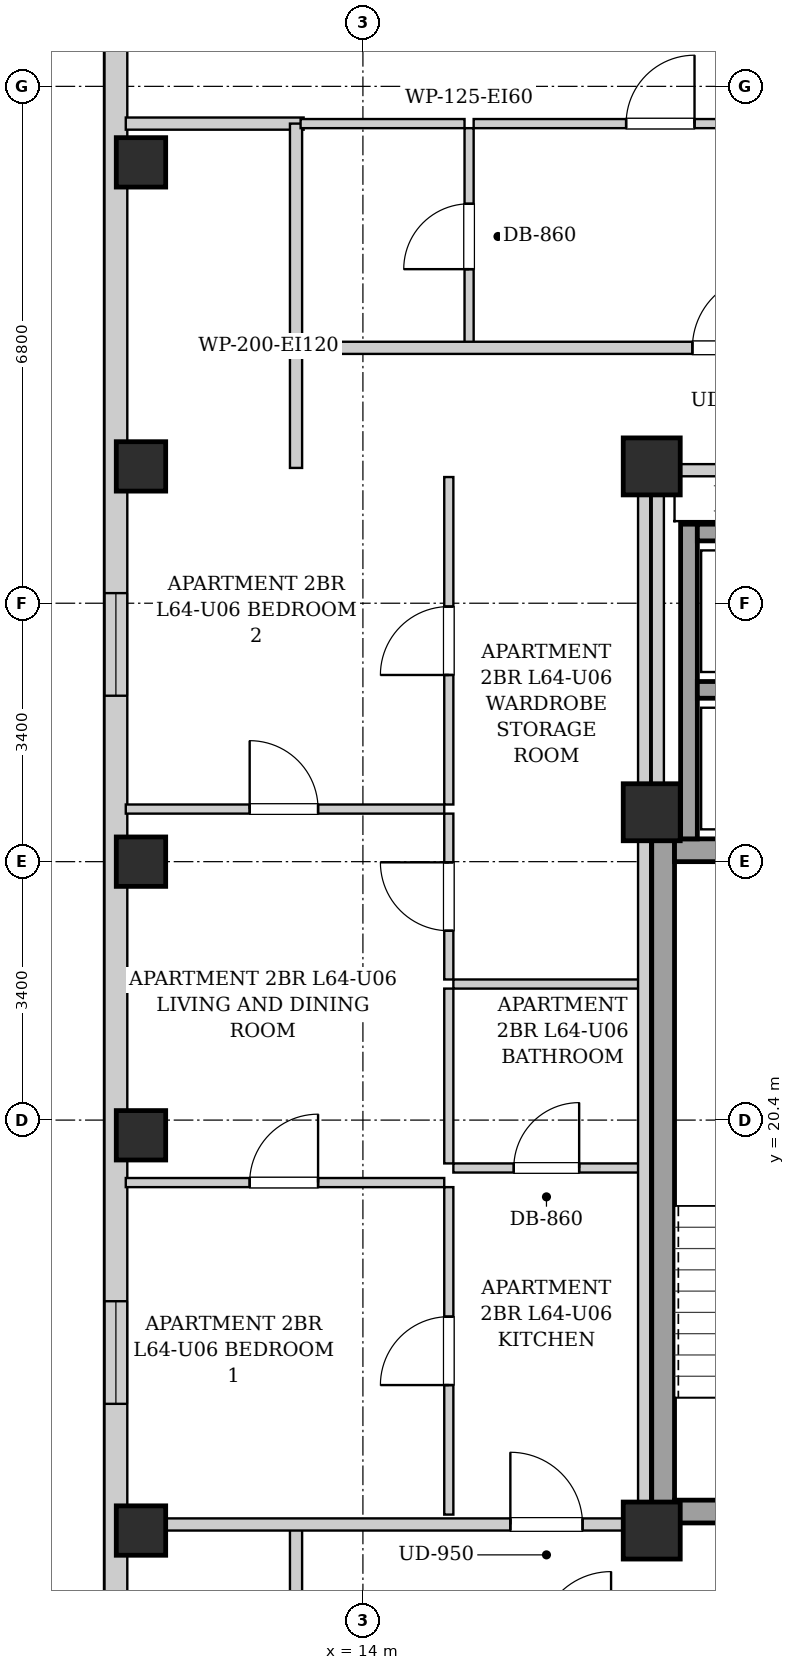
"""IFC4 building model, lengths in metres.
Left out: names, types, materials, properties, quantities, classifications, styles, units other than length and angle.
Written with IfcOpenShell. Run it as: python <this file> out.ifc"""

import sys

from ifc_helpers import new_model, si_unit, direction, frame, frame_2d, origin, origin_2d, place, context, subcontext, project, spatial, rectangle, extrude, element, fill, save


model = new_model("IFC4")
c1 = context("Model", 3, precision=1e-05, world=origin(), true_north=direction((0.0, 1.0)))
c2 = subcontext(c1, "Body", "Model", "MODEL_VIEW")
j1 = project(units=[si_unit("LENGTHUNIT", "METRE"), si_unit("PLANEANGLEUNIT", "RADIAN")], contexts=[c1])
p1 = place(None, origin())
s1 = spatial("IfcSite", under=j1, at=p1, CompositionType="ELEMENT")
p2 = place(p1, origin())
s2 = spatial("IfcBuilding", under=s1, at=p2, CompositionType="ELEMENT")
p3 = place(p2, frame((0.0, 0.0, 220.7)))
s3 = spatial("IfcBuildingStorey", under=s2, at=p3, CompositionType="ELEMENT", Elevation=220.7)
for number, where, z_axis, x_axis in (
    (1, (11.08, 15.0, 0.0), (0.0, 0.0, 1.0), (1.0, 0.0, 0.0)),
    (2, (11.08, 20.2, 0.0), (0.0, 0.0, 1.0), (1.0, 0.0, 0.0)),
    (3, (11.08, 23.8, 0.0), (0.0, 0.0, 1.0), (1.0, 0.0, 0.0)),
    (4, (11.08, 29.0, 0.0), (0.0, 0.0, 1.0), (1.0, 0.0, 0.0)),
    (5, (11.08, 33.0, 0.0), (0.0, 0.0, 1.0), (1.0, 0.0, 0.0)),
):
    element("IfcColumn", number, at=place(p3, frame(where, z_axis=z_axis, x_axis=x_axis)), inside=s3, PredefinedType="COLUMN", context=c2, shape_type="SweptSolid", body=[
        extrude(rectangle(XDim=0.65, YDim=0.65, at=origin_2d()), origin(), (0.0, 0.0, 1.0), 3.4),
    ])
for number, where, z_axis, x_axis in (
    (6, (17.8, 15.0, 0.0), (0.0, 0.0, 1.0), (1.0, 0.0, 0.0)),
    (7, (17.8, 29.0, 0.0), (0.0, 0.0, 1.0), (1.0, 0.0, 0.0)),
    (8, (17.8, 24.45, 0.0), (0.0, 0.0, 1.0), (1.0, 0.0, 0.0)),
):
    element("IfcColumn", number, at=place(p3, frame(where, z_axis=z_axis, x_axis=x_axis)), inside=s3, PredefinedType="COLUMN", context=c2, shape_type="SweptSolid", body=[
        extrude(rectangle(XDim=0.75, YDim=0.75, at=origin_2d()), origin(), (0.0, 0.0, 1.0), 3.4),
    ])
p4 = place(p3, frame((10.75, 6.3, 0.0), z_axis=(0.0, 0.0, 1.0), x_axis=(0.0, 1.0, 0.0)))
e9 = element("IfcWall", 9, at=p4, inside=s3, PredefinedType="SOLIDWALL", context=c2, shape_type="SweptSolid", body=[
    extrude(rectangle(XDim=31.4, YDim=0.3, at=frame_2d((15.7, 0.0))), origin(), (0.0, 0.0, 1.0), 3.14),
])
p5 = place(p4, frame((1.504, 0.0, 0.55)))
e10 = element("IfcOpeningElement", 10, at=p5, cuts=e9, PredefinedType="OPENING", context=c2, shape_type="SweptSolid", body=[
    extrude(rectangle(XDim=1.35, YDim=1.2, at=frame_2d((0.675, 0.6))), frame((0.0, 0.16, 0.0), z_axis=(0.0, -1.0, 0.0), x_axis=(1.0, 0.0, 0.0)), (0.0, 0.0, 1.0), 0.32),
])
p6 = place(p4, frame((28.546, 0.0, 0.55)))
e11 = element("IfcOpeningElement", 11, at=p6, cuts=e9, PredefinedType="OPENING", context=c2, shape_type="SweptSolid", body=[
    extrude(rectangle(XDim=1.35, YDim=1.2, at=frame_2d((0.675, 0.6))), frame((0.0, 0.16, 0.0), z_axis=(0.0, -1.0, 0.0), x_axis=(1.0, 0.0, 0.0)), (0.0, 0.0, 1.0), 0.32),
])
p7 = place(p4, frame((10.367, 0.0, 0.55)))
e12 = element("IfcOpeningElement", 12, at=p7, cuts=e9, PredefinedType="OPENING", context=c2, shape_type="SweptSolid", body=[
    extrude(rectangle(XDim=1.35, YDim=1.2, at=frame_2d((0.675, 0.6))), frame((0.0, 0.16, 0.0), z_axis=(0.0, -1.0, 0.0), x_axis=(1.0, 0.0, 0.0)), (0.0, 0.0, 1.0), 0.32),
])
p8 = place(p4, frame((19.683, 0.0, 0.55)))
e13 = element("IfcOpeningElement", 13, at=p8, cuts=e9, PredefinedType="OPENING", context=c2, shape_type="SweptSolid", body=[
    extrude(rectangle(XDim=1.35, YDim=1.2, at=frame_2d((0.675, 0.6))), frame((0.0, 0.16, 0.0), z_axis=(0.0, -1.0, 0.0), x_axis=(1.0, 0.0, 0.0)), (0.0, 0.0, 1.0), 0.32),
])
p9 = place(p3, frame((17.95, 15.1, 0.0), z_axis=(0.0, 0.0, 1.0), x_axis=(0.0, 1.0, 0.0)))
e14 = element("IfcWall", 14, at=p9, inside=s3, PredefinedType="SHEAR", context=c2, shape_type="SweptSolid", body=[
    extrude(rectangle(XDim=9.0, YDim=0.3, at=frame_2d((4.5, 0.0))), origin(), (0.0, 0.0, 1.0), 3.14),
])
p10 = place(p3, frame((18.1, 23.95, 0.0), z_axis=(0.0, 0.0, 1.0), x_axis=(1.0, 0.0, 0.0)))
e15 = element("IfcWall", 15, at=p10, inside=s3, PredefinedType="SHEAR", context=c2, shape_type="SweptSolid", body=[
    extrude(rectangle(XDim=2.85, YDim=0.3, at=frame_2d((1.425, 0.0))), origin(), (0.0, 0.0, 1.0), 3.14),
])
p11 = place(p3, frame((18.1, 15.25, 0.0), z_axis=(0.0, 0.0, 1.0), x_axis=(1.0, 0.0, 0.0)))
e16 = element("IfcWall", 16, at=p11, inside=s3, PredefinedType="SHEAR", context=c2, shape_type="SweptSolid", body=[
    extrude(rectangle(XDim=2.85, YDim=0.3, at=frame_2d((1.425, 0.0))), origin(), (0.0, 0.0, 1.0), 3.14),
])
p12 = place(p11, frame((0.86, 0.0, 0.0)))
e17 = element("IfcOpeningElement", 17, at=p12, cuts=e16, PredefinedType="OPENING", context=c2, shape_type="SweptSolid", body=[
    extrude(rectangle(XDim=1.1, YDim=2.05, at=frame_2d((0.55, 1.025))), frame((0.0, 0.16, 0.0), z_axis=(0.0, -1.0, 0.0), x_axis=(1.0, 0.0, 0.0)), (0.0, 0.0, 1.0), 0.32),
])
p13 = place(p3, frame((18.29, 24.1, 0.0), z_axis=(0.0, 0.0, 1.0), x_axis=(0.0, 1.0, 0.0)))
e18 = element("IfcWall", 18, at=p13, inside=s3, PredefinedType="SHEAR", context=c2, shape_type="SweptSolid", body=[
    extrude(rectangle(XDim=4.14, YDim=0.22, at=frame_2d((2.07, 0.0))), origin(), (0.0, 0.0, 1.0), 3.14),
])
for number, where, z_axis, x_axis in (
    (19, (18.4, 26.06, 0.0), (0.0, 0.0, 1.0), (1.0, 0.0, 0.0)),
    (20, (18.4, 28.13, 0.0), (0.0, 0.0, 1.0), (1.0, 0.0, 0.0)),
):
    element("IfcWall", number, at=place(p3, frame(where, z_axis=z_axis, x_axis=x_axis)), inside=s3, PredefinedType="SHEAR", context=c2, shape_type="SweptSolid", body=[
        extrude(rectangle(XDim=1.9, YDim=0.22, at=frame_2d((0.95, 0.0))), origin(), (0.0, 0.0, 1.0), 3.14),
    ])
p14 = place(p3, frame((17.88, 24.12, 0.0), z_axis=(0.0, 0.0, 1.0), x_axis=(0.0, 1.0, 0.0)))
e21 = element("IfcWall", 21, at=p14, inside=s3, PredefinedType="PARTITIONING", context=c2, shape_type="SweptSolid", body=[
    extrude(rectangle(XDim=4.76, YDim=0.16, at=frame_2d((2.38, 0.0))), origin(), (0.0, 0.0, 1.0), 3.14),
])
p15 = place(p3, frame((17.96, 28.95, 0.0), z_axis=(0.0, 0.0, 1.0), x_axis=(1.0, 0.0, 0.0)))
e22 = element("IfcWall", 22, at=p15, inside=s3, PredefinedType="PARTITIONING", context=c2, shape_type="SweptSolid", body=[
    extrude(rectangle(XDim=4.29, YDim=0.16, at=frame_2d((2.145, 0.0))), origin(), (0.0, 0.0, 1.0), 2.668),
])
p16 = place(p15, frame((1.715, 0.0, 0.0)))
e23 = element("IfcOpeningElement", 23, at=p16, cuts=e22, PredefinedType="OPENING", context=c2, shape_type="SweptSolid", body=[
    extrude(rectangle(XDim=0.86, YDim=2.05, at=frame_2d((0.43, 1.025))), frame((0.0, 0.09, 0.0), z_axis=(0.0, -1.0, 0.0), x_axis=(1.0, 0.0, 0.0)), (0.0, 0.0, 1.0), 0.18),
])
for number, where, z_axis, x_axis in (
    (24, (13.12, 13.51, 0.0), (0.0, 0.0, 1.0), (0.0, 1.0, 0.0)),
    (25, (13.12, 28.98, 0.0), (0.0, 0.0, 1.0), (0.0, 1.0, 0.0)),
):
    element("IfcWall", number, at=place(p3, frame(where, z_axis=z_axis, x_axis=x_axis)), inside=s3, PredefinedType="PARTITIONING", context=c2, shape_type="SweptSolid", body=[
        extrude(rectangle(XDim=1.58, YDim=0.16, at=frame_2d((0.79, 0.0))), origin(), (0.0, 0.0, 1.0), 3.14),
    ])
p17 = place(p3, frame((10.88, 33.51, 0.0), z_axis=(0.0, 0.0, 1.0), x_axis=(1.0, 0.0, 0.0)))
e26 = element("IfcWall", 26, at=p17, inside=s3, PredefinedType="PARTITIONING", context=c2, shape_type="SweptSolid", body=[
    extrude(rectangle(XDim=2.34, YDim=0.16, at=frame_2d((1.17, 0.0))), origin(), (0.0, 0.0, 1.0), 3.14),
])
p18 = place(p3, frame((13.12, 30.6, 0.0), z_axis=(0.0, 0.0, 1.0), x_axis=(0.0, 1.0, 0.0)))
e27 = element("IfcWall", 27, at=p18, inside=s3, PredefinedType="PARTITIONING", context=c2, shape_type="SweptSolid", body=[
    extrude(rectangle(XDim=2.91, YDim=0.16, at=frame_2d((1.455, 0.0))), origin(), (0.0, 0.0, 1.0), 3.14),
])
p19 = place(p3, frame((15.397, 30.6, 0.0), z_axis=(0.0, 0.0, 1.0), x_axis=(0.0, 1.0, 0.0)))
e28 = element("IfcWall", 28, at=p19, inside=s3, PredefinedType="PARTITIONING", context=c2, shape_type="SweptSolid", body=[
    extrude(rectangle(XDim=2.85, YDim=0.12, at=frame_2d((1.425, 0.0))), origin(), (0.0, 0.0, 1.0), 3.14),
])
p20 = place(p19, frame((0.995, 0.0, 0.0)))
e29 = element("IfcOpeningElement", 29, at=p20, cuts=e28, PredefinedType="OPENING", context=c2, shape_type="SweptSolid", body=[
    extrude(rectangle(XDim=0.86, YDim=2.05, at=frame_2d((0.43, 1.025))), frame((0.0, 0.07, 0.0), z_axis=(0.0, -1.0, 0.0), x_axis=(1.0, 0.0, 0.0)), (0.0, 0.0, 1.0), 0.14),
])
p21 = place(p3, frame((13.18, 33.51, 0.0), z_axis=(0.0, 0.0, 1.0), x_axis=(1.0, 0.0, 0.0)))
e30 = element("IfcWall", 30, at=p21, inside=s3, PredefinedType="PARTITIONING", context=c2, shape_type="SweptSolid", body=[
    extrude(rectangle(XDim=2.157, YDim=0.12, at=frame_2d((1.079, 0.0))), origin(), (0.0, 0.0, 1.0), 3.14),
])
p22 = place(p3, frame((15.457, 33.51, 0.0), z_axis=(0.0, 0.0, 1.0), x_axis=(1.0, 0.0, 0.0)))
e31 = element("IfcWall", 31, at=p22, inside=s3, PredefinedType="PARTITIONING", context=c2, shape_type="SweptSolid", body=[
    extrude(rectangle(XDim=4.913, YDim=0.12, at=frame_2d((2.457, 0.0))), origin(), (0.0, 0.0, 1.0), 3.14),
])
p23 = place(p22, frame((2.006, 0.0, 0.0)))
e32 = element("IfcOpeningElement", 32, at=p23, cuts=e31, PredefinedType="OPENING", context=c2, shape_type="SweptSolid", body=[
    extrude(rectangle(XDim=0.9, YDim=2.05, at=frame_2d((0.45, 1.025))), frame((0.0, 0.07, 0.0), z_axis=(0.0, -1.0, 0.0), x_axis=(1.0, 0.0, 0.0)), (0.0, 0.0, 1.0), 0.14),
])
p24 = place(p3, frame((10.88, 15.08, 0.0), z_axis=(0.0, 0.0, 1.0), x_axis=(1.0, 0.0, 0.0)))
e33 = element("IfcWall", 33, at=p24, inside=s3, PredefinedType="PARTITIONING", context=c2, shape_type="SweptSolid", body=[
    extrude(rectangle(XDim=6.88, YDim=0.16, at=frame_2d((3.44, 0.0))), origin(), (0.0, 0.0, 1.0), 2.668),
])
p25 = place(p24, frame((5.06, 0.0, 0.0)))
e34 = element("IfcOpeningElement", 34, at=p25, cuts=e33, PredefinedType="OPENING", context=c2, shape_type="SweptSolid", body=[
    extrude(rectangle(XDim=0.95, YDim=2.1, at=frame_2d((0.475, 1.05))), frame((0.0, 0.09, 0.0), z_axis=(0.0, -1.0, 0.0), x_axis=(1.0, 0.0, 0.0)), (0.0, 0.0, 1.0), 0.18),
])
p26 = place(p3, frame((15.19, 22.19, 0.0), z_axis=(0.0, 0.0, 1.0), x_axis=(1.0, 0.0, 0.0)))
e35 = element("IfcWall", 35, at=p26, inside=s3, PredefinedType="PARTITIONING", context=c2, shape_type="SweptSolid", body=[
    extrude(rectangle(XDim=2.45, YDim=0.12, at=frame_2d((1.225, 0.0))), origin(), (0.0, 0.0, 1.0), 3.14),
])
p27 = place(p3, frame((15.13, 22.25, 0.0), z_axis=(0.0, 0.0, 1.0), x_axis=(0.0, 1.0, 0.0)))
e36 = element("IfcWall", 36, at=p27, inside=s3, PredefinedType="PARTITIONING", context=c2, shape_type="SweptSolid", body=[
    extrude(rectangle(XDim=2.182, YDim=0.12, at=frame_2d((1.091, 0.0))), origin(), (0.0, 0.0, 1.0), 3.14),
])
p28 = place(p27, frame((0.641, 0.0, 0.0)))
e37 = element("IfcOpeningElement", 37, at=p28, cuts=e36, PredefinedType="OPENING", context=c2, shape_type="SweptSolid", body=[
    extrude(rectangle(XDim=0.9, YDim=2.05, at=frame_2d((0.45, 1.025))), frame((0.0, 0.07, 0.0), z_axis=(0.0, -1.0, 0.0), x_axis=(1.0, 0.0, 0.0)), (0.0, 0.0, 1.0), 0.14),
])
p29 = place(p3, frame((15.13, 24.552, 0.0), z_axis=(0.0, 0.0, 1.0), x_axis=(0.0, 1.0, 0.0)))
e38 = element("IfcWall", 38, at=p29, inside=s3, PredefinedType="PARTITIONING", context=c2, shape_type="SweptSolid", body=[
    extrude(rectangle(XDim=4.308, YDim=0.12, at=frame_2d((2.154, 0.0))), origin(), (0.0, 0.0, 1.0), 3.14),
])
p30 = place(p29, frame((1.704, 0.0, 0.0)))
e39 = element("IfcOpeningElement", 39, at=p30, cuts=e38, PredefinedType="OPENING", context=c2, shape_type="SweptSolid", body=[
    extrude(rectangle(XDim=0.9, YDim=2.05, at=frame_2d((0.45, 1.025))), frame((0.0, 0.07, 0.0), z_axis=(0.0, -1.0, 0.0), x_axis=(1.0, 0.0, 0.0)), (0.0, 0.0, 1.0), 0.14),
])
p31 = place(p3, frame((15.19, 19.77, 0.0), z_axis=(0.0, 0.0, 1.0), x_axis=(1.0, 0.0, 0.0)))
e40 = element("IfcWall", 40, at=p31, inside=s3, PredefinedType="PARTITIONING", context=c2, shape_type="SweptSolid", body=[
    extrude(rectangle(XDim=2.45, YDim=0.12, at=frame_2d((1.225, 0.0))), origin(), (0.0, 0.0, 1.0), 3.14),
])
p32 = place(p31, frame((0.795, 0.0, 0.0)))
e41 = element("IfcOpeningElement", 41, at=p32, cuts=e40, PredefinedType="OPENING", context=c2, shape_type="SweptSolid", body=[
    extrude(rectangle(XDim=0.86, YDim=2.05, at=frame_2d((0.43, 1.025))), frame((0.0, 0.07, 0.0), z_axis=(0.0, -1.0, 0.0), x_axis=(1.0, 0.0, 0.0)), (0.0, 0.0, 1.0), 0.14),
])
p33 = place(p3, frame((15.13, 19.83, 0.0), z_axis=(0.0, 0.0, 1.0), x_axis=(0.0, 1.0, 0.0)))
e42 = element("IfcWall", 42, at=p33, inside=s3, PredefinedType="PARTITIONING", context=c2, shape_type="SweptSolid", body=[
    extrude(rectangle(XDim=2.3, YDim=0.12, at=frame_2d((1.15, 0.0))), origin(), (0.0, 0.0, 1.0), 3.14),
])
p34 = place(p3, frame((15.13, 15.21, 0.0), z_axis=(0.0, 0.0, 1.0), x_axis=(0.0, 1.0, 0.0)))
e43 = element("IfcWall", 43, at=p34, inside=s3, PredefinedType="PARTITIONING", context=c2, shape_type="SweptSolid", body=[
    extrude(rectangle(XDim=4.308, YDim=0.12, at=frame_2d((2.154, 0.0))), origin(), (0.0, 0.0, 1.0), 3.14),
])
p35 = place(p34, frame((1.704, 0.0, 0.0)))
e44 = element("IfcOpeningElement", 44, at=p35, cuts=e43, PredefinedType="OPENING", context=c2, shape_type="SweptSolid", body=[
    extrude(rectangle(XDim=0.9, YDim=2.05, at=frame_2d((0.45, 1.025))), frame((0.0, 0.07, 0.0), z_axis=(0.0, -1.0, 0.0), x_axis=(1.0, 0.0, 0.0)), (0.0, 0.0, 1.0), 0.14),
])
p36 = place(p3, frame((10.88, 19.578, 0.0), z_axis=(0.0, 0.0, 1.0), x_axis=(1.0, 0.0, 0.0)))
e45 = element("IfcWall", 45, at=p36, inside=s3, PredefinedType="PARTITIONING", context=c2, shape_type="SweptSolid", body=[
    extrude(rectangle(XDim=4.19, YDim=0.12, at=frame_2d((2.095, 0.0))), origin(), (0.0, 0.0, 1.0), 3.14),
])
p37 = place(p36, frame((1.63, 0.0, 0.0)))
e46 = element("IfcOpeningElement", 46, at=p37, cuts=e45, PredefinedType="OPENING", context=c2, shape_type="SweptSolid", body=[
    extrude(rectangle(XDim=0.9, YDim=2.05, at=frame_2d((0.45, 1.025))), frame((0.0, 0.07, 0.0), z_axis=(0.0, -1.0, 0.0), x_axis=(1.0, 0.0, 0.0)), (0.0, 0.0, 1.0), 0.14),
])
p38 = place(p3, frame((10.88, 24.492, 0.0), z_axis=(0.0, 0.0, 1.0), x_axis=(1.0, 0.0, 0.0)))
e47 = element("IfcWall", 47, at=p38, inside=s3, PredefinedType="PARTITIONING", context=c2, shape_type="SweptSolid", body=[
    extrude(rectangle(XDim=4.19, YDim=0.12, at=frame_2d((2.095, 0.0))), origin(), (0.0, 0.0, 1.0), 2.878),
])
p39 = place(p38, frame((1.63, 0.0, 0.0)))
e48 = element("IfcOpeningElement", 48, at=p39, cuts=e47, PredefinedType="OPENING", context=c2, shape_type="SweptSolid", body=[
    extrude(rectangle(XDim=0.9, YDim=2.05, at=frame_2d((0.45, 1.025))), frame((0.0, 0.07, 0.0), z_axis=(0.0, -1.0, 0.0), x_axis=(1.0, 0.0, 0.0)), (0.0, 0.0, 1.0), 0.14),
])
p40 = place(p3, frame((13.15, 30.56, 0.0), z_axis=(0.0, 0.0, 1.0), x_axis=(1.0, 0.0, 0.0)))
e49 = element("IfcWall", 49, at=p40, inside=s3, PredefinedType="PARTITIONING", context=c2, shape_type="SweptSolid", body=[
    extrude(rectangle(XDim=24.6, YDim=0.16, at=frame_2d((12.3, 0.0))), origin(), (0.0, 0.0, 1.0), 3.14),
])
p41 = place(p40, frame((5.185, 0.0, 0.0)))
e50 = element("IfcOpeningElement", 50, at=p41, cuts=e49, PredefinedType="OPENING", context=c2, shape_type="SweptSolid", body=[
    extrude(rectangle(XDim=0.95, YDim=2.1, at=frame_2d((0.475, 1.05))), frame((0.0, 0.09, 0.0), z_axis=(0.0, -1.0, 0.0), x_axis=(1.0, 0.0, 0.0)), (0.0, 0.0, 1.0), 0.18),
])
p42 = place(p40, frame((14.16, 0.0, 0.0)))
e51 = element("IfcOpeningElement", 51, at=p42, cuts=e49, PredefinedType="OPENING", context=c2, shape_type="SweptSolid", body=[
    extrude(rectangle(XDim=0.95, YDim=2.1, at=frame_2d((0.475, 1.05))), frame((0.0, 0.09, 0.0), z_axis=(0.0, -1.0, 0.0), x_axis=(1.0, 0.0, 0.0)), (0.0, 0.0, 1.0), 0.18),
])
p43 = place(p40, frame((22.825, 0.0, 0.0)))
e52 = element("IfcOpeningElement", 52, at=p43, cuts=e49, PredefinedType="OPENING", context=c2, shape_type="SweptSolid", body=[
    extrude(rectangle(XDim=0.95, YDim=2.1, at=frame_2d((0.475, 1.05))), frame((0.0, 0.09, 0.0), z_axis=(0.0, -1.0, 0.0), x_axis=(1.0, 0.0, 0.0)), (0.0, 0.0, 1.0), 0.18),
])
p44 = place(p3, frame((17.7, 15.02, 0.0), z_axis=(0.0, 0.0, 1.0), x_axis=(0.0, 1.0, 0.0)))
e53 = element("IfcWall", 53, at=p44, inside=s3, PredefinedType="PARTITIONING", context=c2, shape_type="SweptSolid", body=[
    extrude(rectangle(XDim=13.98, YDim=0.16, at=frame_2d((6.99, 0.0))), origin(), (0.0, 0.0, 1.0), 3.14),
])
p45 = place(p20, origin())
e54 = element("IfcDoor", 54, at=p45, inside=s3, OperationType="SINGLE_SWING_LEFT", PredefinedType="DOOR", context=c2, shape_type="SweptSolid", body=[
    extrude(rectangle(XDim=0.86, YDim=2.05, at=frame_2d((0.43, 1.025))), frame((0.0, 0.025, 0.0), z_axis=(0.0, -1.0, 0.0), x_axis=(1.0, 0.0, 0.0)), (0.0, 0.0, 1.0), 0.05),
])
fill(e29, e54)
p46 = place(p23, origin())
e55 = element("IfcDoor", 55, at=p46, inside=s3, OperationType="SINGLE_SWING_RIGHT", PredefinedType="DOOR", context=c2, shape_type="SweptSolid", body=[
    extrude(rectangle(XDim=0.9, YDim=2.05, at=frame_2d((0.45, 1.025))), frame((0.0, 0.025, 0.0), z_axis=(0.0, -1.0, 0.0), x_axis=(1.0, 0.0, 0.0)), (0.0, 0.0, 1.0), 0.05),
])
fill(e32, e55)
p47 = place(p25, origin())
e56 = element("IfcDoor", 56, at=p47, inside=s3, OperationType="SINGLE_SWING_LEFT", PredefinedType="DOOR", context=c2, shape_type="SweptSolid", body=[
    extrude(rectangle(XDim=0.95, YDim=2.1, at=frame_2d((0.475, 1.05))), frame((0.0, 0.025, 0.0), z_axis=(0.0, -1.0, 0.0), x_axis=(1.0, 0.0, 0.0)), (0.0, 0.0, 1.0), 0.05),
])
fill(e34, e56)
p48 = place(p28, origin())
e57 = element("IfcDoor", 57, at=p48, inside=s3, OperationType="SINGLE_SWING_RIGHT", PredefinedType="DOOR", context=c2, shape_type="SweptSolid", body=[
    extrude(rectangle(XDim=0.9, YDim=2.05, at=frame_2d((0.45, 1.025))), frame((0.0, 0.025, 0.0), z_axis=(0.0, -1.0, 0.0), x_axis=(1.0, 0.0, 0.0)), (0.0, 0.0, 1.0), 0.05),
])
fill(e37, e57)
p49 = place(p30, origin())
e58 = element("IfcDoor", 58, at=p49, inside=s3, OperationType="SINGLE_SWING_LEFT", PredefinedType="DOOR", context=c2, shape_type="SweptSolid", body=[
    extrude(rectangle(XDim=0.9, YDim=2.05, at=frame_2d((0.45, 1.025))), frame((0.0, 0.025, 0.0), z_axis=(0.0, -1.0, 0.0), x_axis=(1.0, 0.0, 0.0)), (0.0, 0.0, 1.0), 0.05),
])
fill(e39, e58)
p50 = place(p32, origin())
e59 = element("IfcDoor", 59, at=p50, inside=s3, OperationType="SINGLE_SWING_RIGHT", PredefinedType="DOOR", context=c2, shape_type="SweptSolid", body=[
    extrude(rectangle(XDim=0.86, YDim=2.05, at=frame_2d((0.43, 1.025))), frame((0.0, 0.025, 0.0), z_axis=(0.0, -1.0, 0.0), x_axis=(1.0, 0.0, 0.0)), (0.0, 0.0, 1.0), 0.05),
])
fill(e41, e59)
p51 = place(p35, origin())
e60 = element("IfcDoor", 60, at=p51, inside=s3, OperationType="SINGLE_SWING_LEFT", PredefinedType="DOOR", context=c2, shape_type="SweptSolid", body=[
    extrude(rectangle(XDim=0.9, YDim=2.05, at=frame_2d((0.45, 1.025))), frame((0.0, 0.025, 0.0), z_axis=(0.0, -1.0, 0.0), x_axis=(1.0, 0.0, 0.0)), (0.0, 0.0, 1.0), 0.05),
])
fill(e44, e60)
p52 = place(p37, origin())
e61 = element("IfcDoor", 61, at=p52, inside=s3, OperationType="SINGLE_SWING_RIGHT", PredefinedType="DOOR", context=c2, shape_type="SweptSolid", body=[
    extrude(rectangle(XDim=0.9, YDim=2.05, at=frame_2d((0.45, 1.025))), frame((0.0, 0.025, 0.0), z_axis=(0.0, -1.0, 0.0), x_axis=(1.0, 0.0, 0.0)), (0.0, 0.0, 1.0), 0.05),
])
fill(e46, e61)
p53 = place(p39, origin())
e62 = element("IfcDoor", 62, at=p53, inside=s3, OperationType="SINGLE_SWING_LEFT", PredefinedType="DOOR", context=c2, shape_type="SweptSolid", body=[
    extrude(rectangle(XDim=0.9, YDim=2.05, at=frame_2d((0.45, 1.025))), frame((0.0, 0.025, 0.0), z_axis=(0.0, -1.0, 0.0), x_axis=(1.0, 0.0, 0.0)), (0.0, 0.0, 1.0), 0.05),
])
fill(e48, e62)
p54 = place(p41, origin())
e63 = element("IfcDoor", 63, at=p54, inside=s3, OperationType="SINGLE_SWING_RIGHT", PredefinedType="DOOR", context=c2, shape_type="SweptSolid", body=[
    extrude(rectangle(XDim=0.95, YDim=2.1, at=frame_2d((0.475, 1.05))), frame((0.0, 0.025, 0.0), z_axis=(0.0, -1.0, 0.0), x_axis=(1.0, 0.0, 0.0)), (0.0, 0.0, 1.0), 0.05),
])
fill(e50, e63)
p55 = place(p7, origin())
e64 = element("IfcWindow", 64, at=p55, inside=s3, PartitioningType="SINGLE_PANEL", PredefinedType="WINDOW", context=c2, shape_type="SweptSolid", body=[
    extrude(rectangle(XDim=1.35, YDim=1.2, at=frame_2d((0.675, 0.6))), frame((0.0, 0.03, 0.0), z_axis=(0.0, -1.0, 0.0), x_axis=(1.0, 0.0, 0.0)), (0.0, 0.0, 1.0), 0.06),
])
fill(e12, e64)
p56 = place(p8, origin())
e65 = element("IfcWindow", 65, at=p56, inside=s3, PartitioningType="SINGLE_PANEL", PredefinedType="WINDOW", context=c2, shape_type="SweptSolid", body=[
    extrude(rectangle(XDim=1.35, YDim=1.2, at=frame_2d((0.675, 0.6))), frame((0.0, 0.03, 0.0), z_axis=(0.0, -1.0, 0.0), x_axis=(1.0, 0.0, 0.0)), (0.0, 0.0, 1.0), 0.06),
])
fill(e13, e65)
save(model, sys.argv[1])
